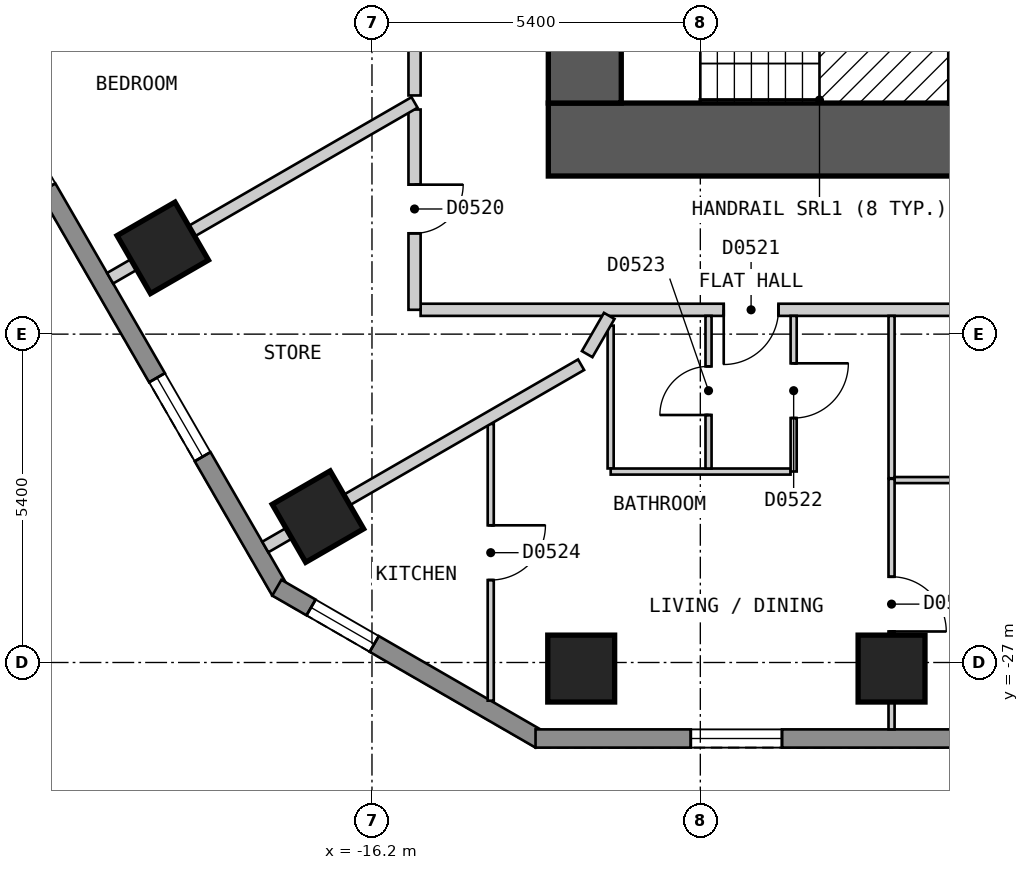
"""IFC4 building model, lengths in metres.
Left out: names, types, materials, properties, quantities, classifications, styles, units other than length and angle.
Written with IfcOpenShell. Run it as: python <this file> out.ifc"""

import sys

from ifc_helpers import new_model, si_unit, direction, frame, frame_2d, origin, origin_2d, place, context, subcontext, project, spatial, polyline, rectangle, outline, extrude, element, fill, save


model = new_model("IFC4")
c1 = context("Model", 3, precision=1e-05, world=origin(), true_north=direction((0.0, 1.0)))
c2 = subcontext(c1, "Body", "Model", "MODEL_VIEW")
j1 = project(units=[si_unit("LENGTHUNIT", "METRE"), si_unit("PLANEANGLEUNIT", "RADIAN")], contexts=[c1])
p1 = place(None, origin())
s1 = spatial("IfcSite", under=j1, at=p1, CompositionType="ELEMENT")
p2 = place(p1, origin())
s2 = spatial("IfcBuilding", under=s1, at=p2, CompositionType="ELEMENT")
p3 = place(p2, frame((0.0, 0.0, 44.4)))
s3 = spatial("IfcBuildingStorey", under=s2, at=p3, CompositionType="ELEMENT", Elevation=44.4)
for number, where, z_axis, x_axis in (
    (1, (-19.641, -20.181, 0.0), (0.0, 0.0, 1.0), (0.5, -0.866, 0.0)),
    (2, (-17.089, -24.601, 0.0), (0.0, 0.0, 1.0), (0.5, -0.866, 0.0)),
    (3, (-12.759, -27.1, 0.0), (0.0, 0.0, 1.0), (1.0, 0.0, 0.0)),
    (4, (-7.655, -27.1, 0.0), (0.0, 0.0, 1.0), (1.0, 0.0, 0.0)),
):
    element("IfcColumn", number, at=place(p3, frame(where, z_axis=z_axis, x_axis=x_axis)), inside=s3, PredefinedType="COLUMN", context=c2, shape_type="SweptSolid", body=[
        extrude(rectangle(XDim=1.1, YDim=1.1, at=origin_2d()), origin(), (0.0, 0.0, 1.0), 3.0),
    ])
p4 = place(p3, frame((-13.3, -18.4, 0.0), z_axis=(0.0, 0.0, 1.0), x_axis=(1.0, 0.0, 0.0)))
e5 = element("IfcWall", 5, at=p4, inside=s3, PredefinedType="SHEAR", context=c2, shape_type="SweptSolid", body=[
    extrude(rectangle(XDim=26.6, YDim=1.2, at=frame_2d((13.3, 0.0))), origin(), (0.0, 0.0, 1.0), 2.7),
])
p5 = place(p3, frame((-12.7, -17.8, 0.0), z_axis=(0.0, 0.0, 1.0), x_axis=(0.0, 1.0, 0.0)))
e6 = element("IfcWall", 6, at=p5, inside=s3, PredefinedType="SHEAR", context=c2, shape_type="SweptSolid", body=[
    extrude(rectangle(XDim=11.6, YDim=1.2, at=frame_2d((5.8, 0.0))), origin(), (0.0, 0.0, 1.0), 2.7),
])
p6 = place(p5, frame((3.6, 0.0, 0.0)))
e7 = element("IfcOpeningElement", 7, at=p6, cuts=e6, PredefinedType="OPENING", context=c2, shape_type="SweptSolid", body=[
    extrude(rectangle(XDim=1.2, YDim=2.1, at=frame_2d((0.6, 1.05))), frame((0.0, 0.61, 0.0), z_axis=(0.0, -1.0, 0.0), x_axis=(1.0, 0.0, 0.0)), (0.0, 0.0, 1.0), 1.22),
])
p7 = place(p3, frame((-31.22, -2.425, 0.0), z_axis=(0.0, 0.0, 1.0), x_axis=(0.500001938803, -0.866024284413, 0.0)))
e8 = element("IfcWall", 8, at=p7, inside=s3, PredefinedType="SOLIDWALL", context=c2, shape_type="SweptSolid", body=[
    extrude(outline(polyline([(0.0, -0.15), (27.02, -0.15), (26.94, 0.15), (0.08, 0.15), (0.0, -0.15)])), origin(), (0.0, 0.0, 1.0), 2.7),
])
p8 = place(p7, frame((2.553, 0.0, 0.15)))
e9 = element("IfcOpeningElement", 9, at=p8, cuts=e8, PredefinedType="OPENING", context=c2, shape_type="SweptSolid", body=[
    extrude(rectangle(XDim=1.5, YDim=2.1, at=frame_2d((0.75, 1.05))), frame((0.0, 0.16, 0.0), z_axis=(0.0, -1.0, 0.0), x_axis=(1.0, 0.0, 0.0)), (0.0, 0.0, 1.0), 0.32),
])
p9 = place(p7, frame((7.657, 0.0, 0.15)))
e10 = element("IfcOpeningElement", 10, at=p9, cuts=e8, PredefinedType="OPENING", context=c2, shape_type="SweptSolid", body=[
    extrude(rectangle(XDim=1.5, YDim=2.1, at=frame_2d((0.75, 1.05))), frame((0.0, 0.16, 0.0), z_axis=(0.0, -1.0, 0.0), x_axis=(1.0, 0.0, 0.0)), (0.0, 0.0, 1.0), 0.32),
])
p10 = place(p7, frame((12.761, 0.0, 0.15)))
e11 = element("IfcOpeningElement", 11, at=p10, cuts=e8, PredefinedType="OPENING", context=c2, shape_type="SweptSolid", body=[
    extrude(rectangle(XDim=1.5, YDim=2.1, at=frame_2d((0.75, 1.05))), frame((0.0, 0.16, 0.0), z_axis=(0.0, -1.0, 0.0), x_axis=(1.0, 0.0, 0.0)), (0.0, 0.0, 1.0), 0.32),
])
p11 = place(p7, frame((17.865, 0.0, 0.15)))
e12 = element("IfcOpeningElement", 12, at=p11, cuts=e8, PredefinedType="OPENING", context=c2, shape_type="SweptSolid", body=[
    extrude(rectangle(XDim=1.5, YDim=2.1, at=frame_2d((0.75, 1.05))), frame((0.0, 0.16, 0.0), z_axis=(0.0, -1.0, 0.0), x_axis=(1.0, 0.0, 0.0)), (0.0, 0.0, 1.0), 0.32),
])
p12 = place(p7, frame((22.969, 0.0, 0.15)))
e13 = element("IfcOpeningElement", 13, at=p12, cuts=e8, PredefinedType="OPENING", context=c2, shape_type="SweptSolid", body=[
    extrude(rectangle(XDim=1.5, YDim=2.1, at=frame_2d((0.75, 1.05))), frame((0.0, 0.16, 0.0), z_axis=(0.0, -1.0, 0.0), x_axis=(1.0, 0.0, 0.0)), (0.0, 0.0, 1.0), 0.32),
])
p13 = place(p3, frame((-17.765, -25.77, 0.0), z_axis=(0.0, 0.0, 1.0), x_axis=(0.866010750942, -0.50002537861, 0.0)))
e14 = element("IfcWall", 14, at=p13, inside=s3, PredefinedType="SOLIDWALL", context=c2, shape_type="SweptSolid", body=[
    extrude(outline(polyline([(0.0, -0.15), (5.0, -0.15), (4.919, 0.15), (0.08, 0.15), (0.0, -0.15)])), origin(), (0.0, 0.0, 1.0), 2.7),
])
p14 = place(p13, frame((0.65, 0.0, 0.15)))
e15 = element("IfcOpeningElement", 15, at=p14, cuts=e14, PredefinedType="OPENING", context=c2, shape_type="SweptSolid", body=[
    extrude(rectangle(XDim=1.2, YDim=2.1, at=frame_2d((0.6, 1.05))), frame((0.0, 0.16, 0.0), z_axis=(0.0, -1.0, 0.0), x_axis=(1.0, 0.0, 0.0)), (0.0, 0.0, 1.0), 0.32),
])
p15 = place(p3, frame((-13.51, -28.25, 0.0), z_axis=(0.0, 0.0, 1.0), x_axis=(1.0, 0.0, 0.0)))
e16 = element("IfcWall", 16, at=p15, inside=s3, PredefinedType="SOLIDWALL", context=c2, shape_type="SweptSolid", body=[
    extrude(outline(polyline([(0.0, -0.15), (27.02, -0.15), (26.94, 0.15), (0.08, 0.15), (0.0, -0.15)])), origin(), (0.0, 0.0, 1.0), 2.7),
])
p16 = place(p15, frame((2.553, 0.0, 0.15)))
e17 = element("IfcOpeningElement", 17, at=p16, cuts=e16, PredefinedType="OPENING", context=c2, shape_type="SweptSolid", body=[
    extrude(rectangle(XDim=1.5, YDim=2.1, at=frame_2d((0.75, 1.05))), frame((0.0, 0.16, 0.0), z_axis=(0.0, -1.0, 0.0), x_axis=(1.0, 0.0, 0.0)), (0.0, 0.0, 1.0), 0.32),
])
p17 = place(p15, frame((7.657, 0.0, 0.15)))
e18 = element("IfcOpeningElement", 18, at=p17, cuts=e16, PredefinedType="OPENING", context=c2, shape_type="SweptSolid", body=[
    extrude(rectangle(XDim=1.5, YDim=2.1, at=frame_2d((0.75, 1.05))), frame((0.0, 0.16, 0.0), z_axis=(0.0, -1.0, 0.0), x_axis=(1.0, 0.0, 0.0)), (0.0, 0.0, 1.0), 0.32),
])
p18 = place(p15, frame((12.761, 0.0, 0.15)))
e19 = element("IfcOpeningElement", 19, at=p18, cuts=e16, PredefinedType="OPENING", context=c2, shape_type="SweptSolid", body=[
    extrude(rectangle(XDim=1.5, YDim=2.1, at=frame_2d((0.75, 1.05))), frame((0.0, 0.16, 0.0), z_axis=(0.0, -1.0, 0.0), x_axis=(1.0, 0.0, 0.0)), (0.0, 0.0, 1.0), 0.32),
])
p19 = place(p15, frame((17.865, 0.0, 0.15)))
e20 = element("IfcOpeningElement", 20, at=p19, cuts=e16, PredefinedType="OPENING", context=c2, shape_type="SweptSolid", body=[
    extrude(rectangle(XDim=1.5, YDim=2.1, at=frame_2d((0.75, 1.05))), frame((0.0, 0.16, 0.0), z_axis=(0.0, -1.0, 0.0), x_axis=(1.0, 0.0, 0.0)), (0.0, 0.0, 1.0), 0.32),
])
p20 = place(p15, frame((22.969, 0.0, 0.15)))
e21 = element("IfcOpeningElement", 21, at=p20, cuts=e16, PredefinedType="OPENING", context=c2, shape_type="SweptSolid", body=[
    extrude(rectangle(XDim=1.5, YDim=2.1, at=frame_2d((0.75, 1.05))), frame((0.0, 0.16, 0.0), z_axis=(0.0, -1.0, 0.0), x_axis=(1.0, 0.0, 0.0)), (0.0, 0.0, 1.0), 0.32),
])
p21 = place(p3, frame((-15.5, -16.5, 0.0), z_axis=(0.0, 0.0, 1.0), x_axis=(0.0, -1.0, 0.0)))
e22 = element("IfcWall", 22, at=p21, inside=s3, PredefinedType="PARTITIONING", context=c2, shape_type="SweptSolid", body=[
    extrude(rectangle(XDim=1.175, YDim=0.2, at=frame_2d((0.587, 0.0))), origin(), (0.0, 0.0, 1.0), 2.7),
])
p22 = place(p3, frame((-15.4, -21.2, 0.0), z_axis=(0.0, 0.0, 1.0), x_axis=(1.0, 0.0, 0.0)))
e23 = element("IfcWall", 23, at=p22, inside=s3, PredefinedType="PARTITIONING", context=c2, shape_type="SweptSolid", body=[
    extrude(rectangle(XDim=30.799, YDim=0.2, at=frame_2d((15.399, 0.0))), origin(), (0.0, 0.0, 1.0), 2.7),
])
p23 = place(p22, frame((4.985, 0.0, 0.0)))
e24 = element("IfcOpeningElement", 24, at=p23, cuts=e23, PredefinedType="OPENING", context=c2, shape_type="SweptSolid", body=[
    extrude(rectangle(XDim=0.9, YDim=2.1, at=frame_2d((0.45, 1.05))), frame((0.0, 0.11, 0.0), z_axis=(0.0, -1.0, 0.0), x_axis=(1.0, 0.0, 0.0)), (0.0, 0.0, 1.0), 0.22),
])
p24 = place(p22, frame((20.005, 0.0, 0.0)))
e25 = element("IfcOpeningElement", 25, at=p24, cuts=e23, PredefinedType="OPENING", context=c2, shape_type="SweptSolid", body=[
    extrude(rectangle(XDim=1.0, YDim=2.1, at=frame_2d((0.5, 1.05))), frame((0.0, 0.11, 0.0), z_axis=(0.0, -1.0, 0.0), x_axis=(1.0, 0.0, 0.0)), (0.0, 0.0, 1.0), 0.22),
])
p25 = place(p22, frame((24.916, 0.0, 0.0)))
e26 = element("IfcOpeningElement", 26, at=p25, cuts=e23, PredefinedType="OPENING", context=c2, shape_type="SweptSolid", body=[
    extrude(rectangle(XDim=0.9, YDim=2.1, at=frame_2d((0.45, 1.05))), frame((0.0, 0.11, 0.0), z_axis=(0.0, -1.0, 0.0), x_axis=(1.0, 0.0, 0.0)), (0.0, 0.0, 1.0), 0.22),
])
p26 = place(p3, frame((-15.5, -21.2, 0.0), z_axis=(0.0, 0.0, 1.0), x_axis=(0.0, 1.0, 0.0)))
e27 = element("IfcWall", 27, at=p26, inside=s3, PredefinedType="PARTITIONING", context=c2, shape_type="SweptSolid", body=[
    extrude(rectangle(XDim=3.294, YDim=0.2, at=frame_2d((1.647, 0.0))), origin(), (0.0, 0.0, 1.0), 2.7),
])
p27 = place(p26, frame((1.258, 0.0, 0.0)))
e28 = element("IfcOpeningElement", 28, at=p27, cuts=e27, PredefinedType="OPENING", context=c2, shape_type="SweptSolid", body=[
    extrude(rectangle(XDim=0.8, YDim=2.1, at=frame_2d((0.4, 1.05))), frame((0.0, 0.11, 0.0), z_axis=(0.0, -1.0, 0.0), x_axis=(1.0, 0.0, 0.0)), (0.0, 0.0, 1.0), 0.22),
])
p28 = place(p3, frame((-7.655, -21.3, 0.0), z_axis=(0.0, 0.0, 1.0), x_axis=(0.0, -1.0, 0.0)))
e29 = element("IfcWall", 29, at=p28, inside=s3, PredefinedType="PARTITIONING", context=c2, shape_type="SweptSolid", body=[
    extrude(rectangle(XDim=2.67, YDim=0.1, at=frame_2d((1.335, 0.0))), origin(), (0.0, 0.0, 1.0), 2.7),
])
p29 = place(p3, frame((-12.275, -21.46, 0.0), z_axis=(0.0, 0.0, 1.0), x_axis=(0.0, -1.0, 0.0)))
e30 = element("IfcWall", 30, at=p29, inside=s3, PredefinedType="PARTITIONING", context=c2, shape_type="SweptSolid", body=[
    extrude(rectangle(XDim=2.349, YDim=0.1, at=frame_2d((1.175, 0.0))), origin(), (0.0, 0.0, 1.0), 2.7),
])
p30 = place(p3, frame((-12.274, -23.86, 0.0), z_axis=(0.0, 0.0, 1.0), x_axis=(1.0, 0.0, 0.0)))
e31 = element("IfcWall", 31, at=p30, inside=s3, PredefinedType="PARTITIONING", context=c2, shape_type="SweptSolid", body=[
    extrude(rectangle(XDim=2.958, YDim=0.1, at=frame_2d((1.479, 0.0))), origin(), (0.0, 0.0, 1.0), 2.7),
])
p31 = place(p3, frame((-7.605, -24.0, 0.0), z_axis=(0.0, 0.0, 1.0), x_axis=(1.0, 0.0, 0.0)))
e32 = element("IfcWall", 32, at=p31, inside=s3, PredefinedType="PARTITIONING", context=c2, shape_type="SweptSolid", body=[
    extrude(rectangle(XDim=5.054, YDim=0.1, at=frame_2d((2.527, 0.0))), origin(), (0.0, 0.0, 1.0), 2.7),
])
p32 = place(p31, frame((2.102, 0.0, 0.0)))
e33 = element("IfcOpeningElement", 33, at=p32, cuts=e32, PredefinedType="OPENING", context=c2, shape_type="SweptSolid", body=[
    extrude(rectangle(XDim=0.8, YDim=2.1, at=frame_2d((0.4, 1.05))), frame((0.0, 0.06, 0.0), z_axis=(0.0, -1.0, 0.0), x_axis=(1.0, 0.0, 0.0)), (0.0, 0.0, 1.0), 0.12),
])
p33 = place(p3, frame((-7.655, -28.1, 0.0), z_axis=(0.0, 0.0, 1.0), x_axis=(0.0, 1.0, 0.0)))
e34 = element("IfcWall", 34, at=p33, inside=s3, PredefinedType="PARTITIONING", context=c2, shape_type="SweptSolid", body=[
    extrude(rectangle(XDim=4.12, YDim=0.1, at=frame_2d((2.06, 0.0))), origin(), (0.0, 0.0, 1.0), 2.7),
])
p34 = place(p33, frame((1.61, 0.0, 0.0)))
e35 = element("IfcOpeningElement", 35, at=p34, cuts=e34, PredefinedType="OPENING", context=c2, shape_type="SweptSolid", body=[
    extrude(rectangle(XDim=0.9, YDim=2.1, at=frame_2d((0.45, 1.05))), frame((0.0, 0.06, 0.0), z_axis=(0.0, -1.0, 0.0), x_axis=(1.0, 0.0, 0.0)), (0.0, 0.0, 1.0), 0.12),
])
p35 = place(p3, frame((-9.265, -23.859, 0.0), z_axis=(0.0, 0.0, 1.0), x_axis=(0.0, 1.0, 0.0)))
e36 = element("IfcWall", 36, at=p35, inside=s3, PredefinedType="PARTITIONING", context=c2, shape_type="SweptSolid", body=[
    extrude(rectangle(XDim=2.559, YDim=0.1, at=frame_2d((1.279, 0.0))), origin(), (0.0, 0.0, 1.0), 2.7),
])
p36 = place(p35, frame((0.879, 0.0, 0.0)))
e37 = element("IfcOpeningElement", 37, at=p36, cuts=e36, PredefinedType="OPENING", context=c2, shape_type="SweptSolid", body=[
    extrude(rectangle(XDim=0.9, YDim=2.1, at=frame_2d((0.45, 1.05))), frame((0.0, 0.06, 0.0), z_axis=(0.0, -1.0, 0.0), x_axis=(1.0, 0.0, 0.0)), (0.0, 0.0, 1.0), 0.12),
])
p37 = place(p3, frame((-10.665, -23.81, 0.0), z_axis=(0.0, 0.0, 1.0), x_axis=(0.0, 1.0, 0.0)))
e38 = element("IfcWall", 38, at=p37, inside=s3, PredefinedType="PARTITIONING", context=c2, shape_type="SweptSolid", body=[
    extrude(rectangle(XDim=2.51, YDim=0.1, at=frame_2d((1.255, 0.0))), origin(), (0.0, 0.0, 1.0), 2.7),
])
p38 = place(p37, frame((0.88, 0.0, 0.0)))
e39 = element("IfcOpeningElement", 39, at=p38, cuts=e38, PredefinedType="OPENING", context=c2, shape_type="SweptSolid", body=[
    extrude(rectangle(XDim=0.8, YDim=2.1, at=frame_2d((0.4, 1.05))), frame((0.0, 0.06, 0.0), z_axis=(0.0, -1.0, 0.0), x_axis=(1.0, 0.0, 0.0)), (0.0, 0.0, 1.0), 0.12),
])
p39 = place(p3, frame((-14.247, -27.628, 0.0), z_axis=(0.0, 0.0, 1.0), x_axis=(0.0, 1.0, 0.0)))
e40 = element("IfcWall", 40, at=p39, inside=s3, PredefinedType="PARTITIONING", context=c2, shape_type="SweptSolid", body=[
    extrude(rectangle(XDim=4.552, YDim=0.1, at=frame_2d((2.276, 0.0))), origin(), (0.0, 0.0, 1.0), 2.7),
])
p40 = place(p39, frame((1.984, 0.0, 0.0)))
e41 = element("IfcOpeningElement", 41, at=p40, cuts=e40, PredefinedType="OPENING", context=c2, shape_type="SweptSolid", body=[
    extrude(rectangle(XDim=0.9, YDim=2.1, at=frame_2d((0.45, 1.05))), frame((0.0, 0.06, 0.0), z_axis=(0.0, -1.0, 0.0), x_axis=(1.0, 0.0, 0.0)), (0.0, 0.0, 1.0), 0.12),
])
p41 = place(p3, frame((-12.661, -21.929, 0.0), z_axis=(0.0, 0.0, 1.0), x_axis=(0.499683639304, 0.866207977689, 0.0)))
e42 = element("IfcWall", 42, at=p41, inside=s3, PredefinedType="PARTITIONING", context=c2, shape_type="SweptSolid", body=[
    extrude(rectangle(XDim=0.726, YDim=0.2, at=frame_2d((0.363, 0.0))), origin(), (0.0, 0.0, 1.0), 2.7),
])
p42 = place(p3, frame((-20.507, -20.681, 0.0), z_axis=(0.0, 0.0, 1.0), x_axis=(0.86602314875, 0.500003905814, 0.0)))
e43 = element("IfcWall", 43, at=p42, inside=s3, PredefinedType="PARTITIONING", context=c2, shape_type="SweptSolid", body=[
    extrude(rectangle(XDim=5.782, YDim=0.2, at=frame_2d((2.891, 0.0))), origin(), (0.0, 0.0, 1.0), 2.7),
])
p43 = place(p3, frame((-17.955, -25.101, 0.0), z_axis=(0.0, 0.0, 1.0), x_axis=(0.866080519133, 0.499904525262, 0.0)))
e44 = element("IfcWall", 44, at=p43, inside=s3, PredefinedType="PARTITIONING", context=c2, shape_type="SweptSolid", body=[
    extrude(rectangle(XDim=5.997, YDim=0.2, at=frame_2d((2.999, 0.0))), origin(), (0.0, 0.0, 1.0), 2.7),
])
p44 = place(p12, origin())
e45 = element("IfcWindow", 45, at=p44, inside=s3, PartitioningType="SINGLE_PANEL", PredefinedType="WINDOW", context=c2, shape_type="SweptSolid", body=[
    extrude(rectangle(XDim=1.5, YDim=2.1, at=frame_2d((0.75, 1.05))), frame((0.0, 0.03, 0.0), z_axis=(0.0, -1.0, 0.0), x_axis=(1.0, 0.0, 0.0)), (0.0, 0.0, 1.0), 0.06),
])
fill(e13, e45)
p45 = place(p14, origin())
e46 = element("IfcWindow", 46, at=p45, inside=s3, PartitioningType="SINGLE_PANEL", PredefinedType="WINDOW", context=c2, shape_type="SweptSolid", body=[
    extrude(rectangle(XDim=1.2, YDim=2.1, at=frame_2d((0.6, 1.05))), frame((0.0, 0.03, 0.0), z_axis=(0.0, -1.0, 0.0), x_axis=(1.0, 0.0, 0.0)), (0.0, 0.0, 1.0), 0.06),
])
fill(e15, e46)
p46 = place(p16, origin())
e47 = element("IfcWindow", 47, at=p46, inside=s3, PartitioningType="SINGLE_PANEL", PredefinedType="WINDOW", context=c2, shape_type="SweptSolid", body=[
    extrude(rectangle(XDim=1.5, YDim=2.1, at=frame_2d((0.75, 1.05))), frame((0.0, 0.03, 0.0), z_axis=(0.0, -1.0, 0.0), x_axis=(1.0, 0.0, 0.0)), (0.0, 0.0, 1.0), 0.06),
])
fill(e17, e47)
p47 = place(p27, origin())
e48 = element("IfcDoor", 48, at=p47, inside=s3, OperationType="SINGLE_SWING_RIGHT", PredefinedType="DOOR", context=c2, shape_type="SweptSolid", body=[
    extrude(rectangle(XDim=0.8, YDim=2.1, at=frame_2d((0.4, 1.05))), frame((0.0, 0.025, 0.0), z_axis=(0.0, -1.0, 0.0), x_axis=(1.0, 0.0, 0.0)), (0.0, 0.0, 1.0), 0.05),
])
fill(e28, e48)
p48 = place(p23, origin())
e49 = element("IfcDoor", 49, at=p48, inside=s3, OperationType="SINGLE_SWING_LEFT", PredefinedType="DOOR", context=c2, shape_type="SweptSolid", body=[
    extrude(rectangle(XDim=0.9, YDim=2.1, at=frame_2d((0.45, 1.05))), frame((0.0, 0.025, 0.0), z_axis=(0.0, -1.0, 0.0), x_axis=(1.0, 0.0, 0.0)), (0.0, 0.0, 1.0), 0.05),
])
fill(e24, e49)
p49 = place(p36, origin())
e50 = element("IfcDoor", 50, at=p49, inside=s3, OperationType="SINGLE_SWING_RIGHT", PredefinedType="DOOR", context=c2, shape_type="SweptSolid", body=[
    extrude(rectangle(XDim=0.9, YDim=2.1, at=frame_2d((0.45, 1.05))), frame((0.0, 0.025, 0.0), z_axis=(0.0, -1.0, 0.0), x_axis=(1.0, 0.0, 0.0)), (0.0, 0.0, 1.0), 0.05),
])
fill(e37, e50)
p50 = place(p38, origin())
e51 = element("IfcDoor", 51, at=p50, inside=s3, OperationType="SINGLE_SWING_LEFT", PredefinedType="DOOR", context=c2, shape_type="SweptSolid", body=[
    extrude(rectangle(XDim=0.8, YDim=2.1, at=frame_2d((0.4, 1.05))), frame((0.0, 0.025, 0.0), z_axis=(0.0, -1.0, 0.0), x_axis=(1.0, 0.0, 0.0)), (0.0, 0.0, 1.0), 0.05),
])
fill(e39, e51)
p51 = place(p40, origin())
e52 = element("IfcDoor", 52, at=p51, inside=s3, OperationType="SINGLE_SWING_RIGHT", PredefinedType="DOOR", context=c2, shape_type="SweptSolid", body=[
    extrude(rectangle(XDim=0.9, YDim=2.1, at=frame_2d((0.45, 1.05))), frame((0.0, 0.025, 0.0), z_axis=(0.0, -1.0, 0.0), x_axis=(1.0, 0.0, 0.0)), (0.0, 0.0, 1.0), 0.05),
])
fill(e41, e52)
p52 = place(p34, origin())
e53 = element("IfcDoor", 53, at=p52, inside=s3, OperationType="SINGLE_SWING_LEFT", PredefinedType="DOOR", context=c2, shape_type="SweptSolid", body=[
    extrude(rectangle(XDim=0.9, YDim=2.1, at=frame_2d((0.45, 1.05))), frame((0.0, 0.025, 0.0), z_axis=(0.0, -1.0, 0.0), x_axis=(1.0, 0.0, 0.0)), (0.0, 0.0, 1.0), 0.05),
])
fill(e35, e53)
save(model, sys.argv[1])
